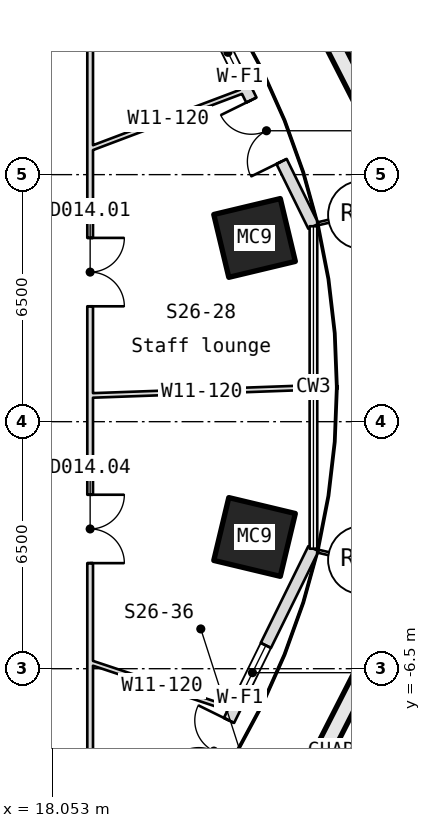
"""IFC4 building model, lengths in metres.
Left out: names, types, materials, properties, quantities, classifications, styles, units other than length and angle.
Written with IfcOpenShell. Run it as: python <this file> out.ifc"""

import sys

from ifc_helpers import new_model, si_unit, direction, frame, frame_2d, origin, origin_2d, place, context, subcontext, project, spatial, rectangle, hollow_rectangle, extrude, element, fill, save


model = new_model("IFC4")
c1 = context("Model", 3, precision=1e-05, world=origin(), true_north=direction((0.0, 1.0)))
c2 = subcontext(c1, "Body", "Model", "MODEL_VIEW")
j1 = project(units=[si_unit("LENGTHUNIT", "METRE"), si_unit("PLANEANGLEUNIT", "RADIAN")], contexts=[c1])
p1 = place(None, origin())
s1 = spatial("IfcSite", under=j1, at=p1, CompositionType="ELEMENT")
p2 = place(p1, origin())
s2 = spatial("IfcBuilding", under=s1, at=p2, CompositionType="ELEMENT")
p3 = place(p2, frame((0.0, 0.0, 371.65)))
s3 = spatial("IfcBuildingStorey", under=s2, at=p3, CompositionType="ELEMENT", Elevation=371.65)
for number, where, z_axis, x_axis in (
    (1, (23.376, 4.834, -0.18), (0.0, 0.0, 1.0), (0.233, -0.973, 0.0)),
    (2, (23.376, -3.034, -0.18), (0.0, 0.0, 1.0), (-0.233, -0.973, 0.0)),
):
    element("IfcColumn", number, at=place(p3, frame(where, z_axis=z_axis, x_axis=x_axis)), inside=s3, PredefinedType="COLUMN", context=c2, shape_type="SweptSolid", body=[
        extrude(hollow_rectangle(XDim=1.7, YDim=1.8, WallThickness=0.05, at=origin_2d()), origin(), (0.0, 0.0, 1.0), 4.15),
    ])
p4 = place(p3, frame((24.926, 5.142, 0.0), z_axis=(0.0, 0.0, 1.0), x_axis=(-0.441346217757, 0.897336902212, 0.0)))
e3 = element("IfcWall", 3, at=p4, inside=s3, PredefinedType="SOLIDWALL", context=c2, shape_type="SweptSolid", body=[
    extrude(rectangle(XDim=8.736, YDim=0.3, at=frame_2d((4.368, 0.0))), origin(), (0.0, 0.0, 1.0), 3.97),
])
p5 = place(p4, frame((1.9, 0.0, 0.0)))
e4 = element("IfcOpeningElement", 4, at=p5, cuts=e3, PredefinedType="OPENING", context=c2, shape_type="SweptSolid", body=[
    extrude(rectangle(XDim=1.8, YDim=2.4, at=frame_2d((0.9, 1.2))), frame((0.0, 0.16, 0.0), z_axis=(0.0, -1.0, 0.0), x_axis=(1.0, 0.0, 0.0)), (0.0, 0.0, 1.0), 0.32),
])
p6 = place(p4, frame((4.3, 0.0, 0.9)))
e5 = element("IfcOpeningElement", 5, at=p6, cuts=e3, PredefinedType="OPENING", context=c2, shape_type="SweptSolid", body=[
    extrude(rectangle(XDim=1.6, YDim=1.5, at=frame_2d((0.8, 0.75))), frame((0.0, 0.16, 0.0), z_axis=(0.0, -1.0, 0.0), x_axis=(1.0, 0.0, 0.0)), (0.0, 0.0, 1.0), 0.32),
])
p7 = place(p3, frame((21.07, -11.181, 0.0), z_axis=(0.0, 0.0, 1.0), x_axis=(0.441357286206, 0.897331458221, 0.0)))
e6 = element("IfcWall", 6, at=p7, inside=s3, PredefinedType="SOLIDWALL", context=c2, shape_type="SweptSolid", body=[
    extrude(rectangle(XDim=8.736, YDim=0.3, at=frame_2d((4.368, 0.0))), origin(), (0.0, 0.0, 1.0), 3.97),
])
p8 = place(p7, frame((1.9, 0.0, 0.0)))
e7 = element("IfcOpeningElement", 7, at=p8, cuts=e6, PredefinedType="OPENING", context=c2, shape_type="SweptSolid", body=[
    extrude(rectangle(XDim=1.8, YDim=2.4, at=frame_2d((0.9, 1.2))), frame((0.0, 0.16, 0.0), z_axis=(0.0, -1.0, 0.0), x_axis=(1.0, 0.0, 0.0)), (0.0, 0.0, 1.0), 0.32),
])
p9 = place(p7, frame((4.3, 0.0, 0.9)))
e8 = element("IfcOpeningElement", 8, at=p9, cuts=e6, PredefinedType="OPENING", context=c2, shape_type="SweptSolid", body=[
    extrude(rectangle(XDim=1.6, YDim=1.5, at=frame_2d((0.8, 0.75))), frame((0.0, 0.16, 0.0), z_axis=(0.0, -1.0, 0.0), x_axis=(1.0, 0.0, 0.0)), (0.0, 0.0, 1.0), 0.32),
])
p10 = place(p3, frame((19.05, -6.333, 0.0), z_axis=(0.0, 0.0, 1.0), x_axis=(0.94893391062, -0.31547493288, 0.0)))
e9 = element("IfcWall", 9, at=p10, inside=s3, PredefinedType="PARTITIONING", context=c2, shape_type="SweptSolid", body=[
    extrude(rectangle(XDim=3.989, YDim=0.12, at=frame_2d((1.995, 0.0))), origin(), (0.0, 0.0, 1.0), 3.97),
])
p11 = place(p3, frame((19.05, 0.688, 0.0), z_axis=(0.0, 0.0, 1.0), x_axis=(0.999348759749, 0.036084018458, 0.0)))
e10 = element("IfcWall", 10, at=p11, inside=s3, PredefinedType="PARTITIONING", context=c2, shape_type="SweptSolid", body=[
    extrude(rectangle(XDim=5.88, YDim=0.12, at=frame_2d((2.94, 0.0))), origin(), (0.0, 0.0, 1.0), 3.97),
])
p12 = place(p3, frame((19.05, 7.182, 0.0), z_axis=(0.0, 0.0, 1.0), x_axis=(0.935715632494, 0.352755233989, 0.0)))
e11 = element("IfcWall", 11, at=p12, inside=s3, PredefinedType="PARTITIONING", context=c2, shape_type="SweptSolid", body=[
    extrude(rectangle(XDim=4.393, YDim=0.12, at=frame_2d((2.196, 0.0))), origin(), (0.0, 0.0, 1.0), 3.97),
])
p13 = place(p3, frame((19.05, 11.263, 0.0), z_axis=(0.0, 0.0, 1.0), x_axis=(0.0, -1.0, 0.0)))
e12 = element("IfcWall", 12, at=p13, inside=s3, PredefinedType="PARTITIONING", context=c2, shape_type="SweptSolid", body=[
    extrude(rectangle(XDim=20.929, YDim=0.15, at=frame_2d((10.465, 0.0))), origin(), (0.0, 0.0, 1.0), 3.97),
])
p14 = place(p13, frame((6.428, 0.0, 0.0)))
e13 = element("IfcOpeningElement", 13, at=p14, cuts=e12, PredefinedType="OPENING", context=c2, shape_type="SweptSolid", body=[
    extrude(rectangle(XDim=1.8, YDim=2.1, at=frame_2d((0.9, 1.05))), frame((0.0, 0.085, 0.0), z_axis=(0.0, -1.0, 0.0), x_axis=(1.0, 0.0, 0.0)), (0.0, 0.0, 1.0), 0.17),
])
p15 = place(p13, frame((13.186, 0.0, 0.0)))
e14 = element("IfcOpeningElement", 14, at=p15, cuts=e12, PredefinedType="OPENING", context=c2, shape_type="SweptSolid", body=[
    extrude(rectangle(XDim=1.8, YDim=2.1, at=frame_2d((0.9, 1.05))), frame((0.0, 0.085, 0.0), z_axis=(0.0, -1.0, 0.0), x_axis=(1.0, 0.0, 0.0)), (0.0, 0.0, 1.0), 0.17),
])
p16 = place(p5, origin())
e15 = element("IfcDoor", 15, at=p16, inside=s3, OperationType="SINGLE_SWING_LEFT", PredefinedType="DOOR", context=c2, shape_type="SweptSolid", body=[
    extrude(rectangle(XDim=1.8, YDim=2.4, at=frame_2d((0.9, 1.2))), frame((0.0, 0.025, 0.0), z_axis=(0.0, -1.0, 0.0), x_axis=(1.0, 0.0, 0.0)), (0.0, 0.0, 1.0), 0.05),
])
fill(e4, e15)
p17 = place(p6, origin())
e16 = element("IfcWindow", 16, at=p17, inside=s3, PartitioningType="SINGLE_PANEL", PredefinedType="WINDOW", context=c2, shape_type="SweptSolid", body=[
    extrude(rectangle(XDim=1.6, YDim=1.5, at=frame_2d((0.8, 0.75))), frame((0.0, 0.03, 0.0), z_axis=(0.0, -1.0, 0.0), x_axis=(1.0, 0.0, 0.0)), (0.0, 0.0, 1.0), 0.06),
])
fill(e5, e16)
p18 = place(p8, origin())
e17 = element("IfcDoor", 17, at=p18, inside=s3, OperationType="SINGLE_SWING_LEFT", PredefinedType="DOOR", context=c2, shape_type="SweptSolid", body=[
    extrude(rectangle(XDim=1.8, YDim=2.4, at=frame_2d((0.9, 1.2))), frame((0.0, 0.025, 0.0), z_axis=(0.0, -1.0, 0.0), x_axis=(1.0, 0.0, 0.0)), (0.0, 0.0, 1.0), 0.05),
])
fill(e7, e17)
p19 = place(p9, origin())
e18 = element("IfcWindow", 18, at=p19, inside=s3, PartitioningType="SINGLE_PANEL", PredefinedType="WINDOW", context=c2, shape_type="SweptSolid", body=[
    extrude(rectangle(XDim=1.6, YDim=1.5, at=frame_2d((0.8, 0.75))), frame((0.0, 0.03, 0.0), z_axis=(0.0, -1.0, 0.0), x_axis=(1.0, 0.0, 0.0)), (0.0, 0.0, 1.0), 0.06),
])
fill(e8, e18)
p20 = place(p14, origin())
e19 = element("IfcDoor", 19, at=p20, inside=s3, OperationType="DOUBLE_DOOR_SINGLE_SWING", PredefinedType="DOOR", context=c2, shape_type="SweptSolid", body=[
    extrude(rectangle(XDim=1.8, YDim=2.1, at=frame_2d((0.9, 1.05))), frame((0.0, 0.025, 0.0), z_axis=(0.0, -1.0, 0.0), x_axis=(1.0, 0.0, 0.0)), (0.0, 0.0, 1.0), 0.05),
])
fill(e13, e19)
p21 = place(p15, origin())
e20 = element("IfcDoor", 20, at=p21, inside=s3, OperationType="DOUBLE_DOOR_SINGLE_SWING", PredefinedType="DOOR", context=c2, shape_type="SweptSolid", body=[
    extrude(rectangle(XDim=1.8, YDim=2.1, at=frame_2d((0.9, 1.05))), frame((0.0, 0.025, 0.0), z_axis=(0.0, -1.0, 0.0), x_axis=(1.0, 0.0, 0.0)), (0.0, 0.0, 1.0), 0.05),
])
fill(e14, e20)
save(model, sys.argv[1])
